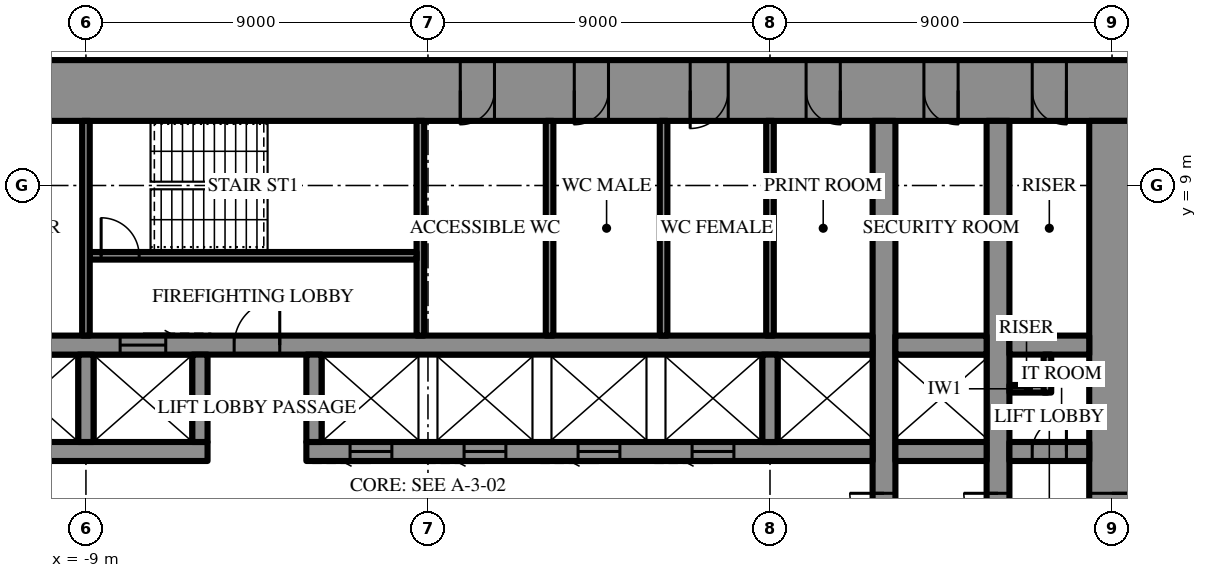
"""IFC4 building model, lengths in metres.
Left out: names, types, materials, properties, quantities, classifications, styles, units other than length and angle.
Written with IfcOpenShell. Run it as: python <this file> out.ifc"""

import sys

from ifc_helpers import new_model, si_unit, direction, frame, frame_2d, origin, place, context, subcontext, project, spatial, rectangle, extrude, element, fill, save


model = new_model("IFC4")
c1 = context("Model", 3, precision=1e-05, world=origin(), true_north=direction((0.0, 1.0)))
c2 = subcontext(c1, "Body", "Model", "MODEL_VIEW")
j1 = project(units=[si_unit("LENGTHUNIT", "METRE"), si_unit("PLANEANGLEUNIT", "RADIAN")], contexts=[c1])
p1 = place(None, origin())
s1 = spatial("IfcSite", under=j1, at=p1, CompositionType="ELEMENT")
p2 = place(p1, origin())
s2 = spatial("IfcBuilding", under=s1, at=p2, CompositionType="ELEMENT")
p3 = place(p2, frame((0.0, 0.0, 127.9)))
s3 = spatial("IfcBuildingStorey", under=s2, at=p3, CompositionType="ELEMENT", Elevation=127.9)
p4 = place(p3, frame((-18.6, 11.5, 0.0), z_axis=(0.0, 0.0, 1.0), x_axis=(1.0, 0.0, 0.0)))
e1 = element("IfcWall", 1, at=p4, inside=s3, PredefinedType="SHEAR", context=c2, shape_type="SweptSolid", body=[
    extrude(rectangle(XDim=37.2, YDim=1.6, at=frame_2d((18.6, 0.0))), origin(), (0.0, 0.0, 1.0), 4.2),
])
p5 = place(p4, frame((19.45, 0.0, 0.0)))
e2 = element("IfcOpeningElement", 2, at=p5, cuts=e1, PredefinedType="OPENING", context=c2, shape_type="SweptSolid", body=[
    extrude(rectangle(XDim=0.9, YDim=2.2, at=frame_2d((0.45, 1.1))), frame((0.0, 0.81, 0.0), z_axis=(0.0, -1.0, 0.0), x_axis=(1.0, 0.0, 0.0)), (0.0, 0.0, 1.0), 1.62),
])
p6 = place(p4, frame((22.45, 0.0, 0.0)))
e3 = element("IfcOpeningElement", 3, at=p6, cuts=e1, PredefinedType="OPENING", context=c2, shape_type="SweptSolid", body=[
    extrude(rectangle(XDim=0.9, YDim=2.2, at=frame_2d((0.45, 1.1))), frame((0.0, 0.81, 0.0), z_axis=(0.0, -1.0, 0.0), x_axis=(1.0, 0.0, 0.0)), (0.0, 0.0, 1.0), 1.62),
])
p7 = place(p4, frame((25.5, 0.0, 0.0)))
e4 = element("IfcOpeningElement", 4, at=p7, cuts=e1, PredefinedType="OPENING", context=c2, shape_type="SweptSolid", body=[
    extrude(rectangle(XDim=1.0, YDim=2.2, at=frame_2d((0.5, 1.1))), frame((0.0, 0.81, 0.0), z_axis=(0.0, -1.0, 0.0), x_axis=(1.0, 0.0, 0.0)), (0.0, 0.0, 1.0), 1.62),
])
p8 = place(p4, frame((1.8, 0.0, 0.0)))
e5 = element("IfcOpeningElement", 5, at=p8, cuts=e1, PredefinedType="OPENING", context=c2, shape_type="SweptSolid", body=[
    extrude(rectangle(XDim=0.9, YDim=2.2, at=frame_2d((0.45, 1.1))), frame((0.0, 0.81, 0.0), z_axis=(0.0, -1.0, 0.0), x_axis=(1.0, 0.0, 0.0)), (0.0, 0.0, 1.0), 1.62),
])
p9 = place(p4, frame((4.65, 0.0, 0.0)))
e6 = element("IfcOpeningElement", 6, at=p9, cuts=e1, PredefinedType="OPENING", context=c2, shape_type="SweptSolid", body=[
    extrude(rectangle(XDim=0.9, YDim=2.2, at=frame_2d((0.45, 1.1))), frame((0.0, 0.81, 0.0), z_axis=(0.0, -1.0, 0.0), x_axis=(1.0, 0.0, 0.0)), (0.0, 0.0, 1.0), 1.62),
])
p10 = place(p4, frame((7.75, 0.0, 0.0)))
e7 = element("IfcOpeningElement", 7, at=p10, cuts=e1, PredefinedType="OPENING", context=c2, shape_type="SweptSolid", body=[
    extrude(rectangle(XDim=0.9, YDim=2.2, at=frame_2d((0.45, 1.1))), frame((0.0, 0.81, 0.0), z_axis=(0.0, -1.0, 0.0), x_axis=(1.0, 0.0, 0.0)), (0.0, 0.0, 1.0), 1.62),
])
p11 = place(p4, frame((28.55, 0.0, 0.0)))
e8 = element("IfcOpeningElement", 8, at=p11, cuts=e1, PredefinedType="OPENING", context=c2, shape_type="SweptSolid", body=[
    extrude(rectangle(XDim=0.9, YDim=2.2, at=frame_2d((0.45, 1.1))), frame((0.0, 0.81, 0.0), z_axis=(0.0, -1.0, 0.0), x_axis=(1.0, 0.0, 0.0)), (0.0, 0.0, 1.0), 1.62),
])
p12 = place(p4, frame((31.65, 0.0, 0.0)))
e9 = element("IfcOpeningElement", 9, at=p12, cuts=e1, PredefinedType="OPENING", context=c2, shape_type="SweptSolid", body=[
    extrude(rectangle(XDim=0.9, YDim=2.2, at=frame_2d((0.45, 1.1))), frame((0.0, 0.81, 0.0), z_axis=(0.0, -1.0, 0.0), x_axis=(1.0, 0.0, 0.0)), (0.0, 0.0, 1.0), 1.62),
])
p13 = place(p4, frame((34.5, 0.0, 0.0)))
e10 = element("IfcOpeningElement", 10, at=p13, cuts=e1, PredefinedType="OPENING", context=c2, shape_type="SweptSolid", body=[
    extrude(rectangle(XDim=0.9, YDim=2.2, at=frame_2d((0.45, 1.1))), frame((0.0, 0.81, 0.0), z_axis=(0.0, -1.0, 0.0), x_axis=(1.0, 0.0, 0.0)), (0.0, 0.0, 1.0), 1.62),
])
p14 = place(p3, frame((18.0, -10.7, 0.0), z_axis=(0.0, 0.0, 1.0), x_axis=(0.0, 1.0, 0.0)))
e11 = element("IfcWall", 11, at=p14, inside=s3, PredefinedType="SHEAR", context=c2, shape_type="SweptSolid", body=[
    extrude(rectangle(XDim=21.4, YDim=1.2, at=frame_2d((10.7, 0.0))), origin(), (0.0, 0.0, 1.0), 4.2),
])
p15 = place(p14, frame((9.8, 0.0, 0.0)))
e12 = element("IfcOpeningElement", 12, at=p15, cuts=e11, PredefinedType="OPENING", context=c2, shape_type="SweptSolid", body=[
    extrude(rectangle(XDim=1.8, YDim=2.4, at=frame_2d((0.9, 1.2))), frame((0.0, 0.61, 0.0), z_axis=(0.0, -1.0, 0.0), x_axis=(1.0, 0.0, 0.0)), (0.0, 0.0, 1.0), 1.22),
])
p16 = place(p3, frame((12.0, -10.7, 0.0), z_axis=(0.0, 0.0, 1.0), x_axis=(0.0, 1.0, 0.0)))
e13 = element("IfcWall", 13, at=p16, inside=s3, PredefinedType="SHEAR", context=c2, shape_type="SweptSolid", body=[
    extrude(rectangle(XDim=21.4, YDim=0.6, at=frame_2d((10.7, 0.0))), origin(), (0.0, 0.0, 1.0), 4.2),
])
p17 = place(p16, frame((9.8, 0.0, 0.0)))
e14 = element("IfcOpeningElement", 14, at=p17, cuts=e13, PredefinedType="OPENING", context=c2, shape_type="SweptSolid", body=[
    extrude(rectangle(XDim=1.8, YDim=2.4, at=frame_2d((0.9, 1.2))), frame((0.0, 0.31, 0.0), z_axis=(0.0, -1.0, 0.0), x_axis=(1.0, 0.0, 0.0)), (0.0, 0.0, 1.0), 0.62),
])
p18 = place(p3, frame((15.0, -10.7, 0.0), z_axis=(0.0, 0.0, 1.0), x_axis=(0.0, 1.0, 0.0)))
e15 = element("IfcWall", 15, at=p18, inside=s3, PredefinedType="SHEAR", context=c2, shape_type="SweptSolid", body=[
    extrude(rectangle(XDim=21.4, YDim=0.6, at=frame_2d((10.7, 0.0))), origin(), (0.0, 0.0, 1.0), 4.2),
])
p19 = place(p18, frame((9.8, 0.0, 0.0)))
e16 = element("IfcOpeningElement", 16, at=p19, cuts=e15, PredefinedType="OPENING", context=c2, shape_type="SweptSolid", body=[
    extrude(rectangle(XDim=1.8, YDim=2.4, at=frame_2d((0.9, 1.2))), frame((0.0, 0.31, 0.0), z_axis=(0.0, -1.0, 0.0), x_axis=(1.0, 0.0, 0.0)), (0.0, 0.0, 1.0), 0.62),
])
p20 = place(p3, frame((-11.7, 2.0, 0.0), z_axis=(0.0, 0.0, 1.0), x_axis=(1.0, 0.0, 0.0)))
e17 = element("IfcWall", 17, at=p20, inside=s3, PredefinedType="SHEAR", context=c2, shape_type="SweptSolid", body=[
    extrude(rectangle(XDim=5.9, YDim=0.5, at=frame_2d((2.95, 0.0))), origin(), (0.0, 0.0, 1.0), 4.2),
])
p21 = place(p3, frame((-3.2, 2.0, 0.0), z_axis=(0.0, 0.0, 1.0), x_axis=(1.0, 0.0, 0.0)))
e18 = element("IfcWall", 18, at=p21, inside=s3, PredefinedType="SHEAR", context=c2, shape_type="SweptSolid", body=[
    extrude(rectangle(XDim=14.9, YDim=0.5, at=frame_2d((7.45, 0.0))), origin(), (0.0, 0.0, 1.0), 4.2),
])
p22 = place(p21, frame((1.15, 0.0, 0.0)))
e19 = element("IfcOpeningElement", 19, at=p22, cuts=e18, PredefinedType="OPENING", context=c2, shape_type="SweptSolid", body=[
    extrude(rectangle(XDim=1.1, YDim=2.2, at=frame_2d((0.55, 1.1))), frame((0.0, 0.26, 0.0), z_axis=(0.0, -1.0, 0.0), x_axis=(1.0, 0.0, 0.0)), (0.0, 0.0, 1.0), 0.52),
])
p23 = place(p21, frame((4.15, 0.0, 0.0)))
e20 = element("IfcOpeningElement", 20, at=p23, cuts=e18, PredefinedType="OPENING", context=c2, shape_type="SweptSolid", body=[
    extrude(rectangle(XDim=1.1, YDim=2.2, at=frame_2d((0.55, 1.1))), frame((0.0, 0.26, 0.0), z_axis=(0.0, -1.0, 0.0), x_axis=(1.0, 0.0, 0.0)), (0.0, 0.0, 1.0), 0.52),
])
p24 = place(p21, frame((7.15, 0.0, 0.0)))
e21 = element("IfcOpeningElement", 21, at=p24, cuts=e18, PredefinedType="OPENING", context=c2, shape_type="SweptSolid", body=[
    extrude(rectangle(XDim=1.1, YDim=2.2, at=frame_2d((0.55, 1.1))), frame((0.0, 0.26, 0.0), z_axis=(0.0, -1.0, 0.0), x_axis=(1.0, 0.0, 0.0)), (0.0, 0.0, 1.0), 0.52),
])
p25 = place(p21, frame((10.15, 0.0, 0.0)))
e22 = element("IfcOpeningElement", 22, at=p25, cuts=e18, PredefinedType="OPENING", context=c2, shape_type="SweptSolid", body=[
    extrude(rectangle(XDim=1.1, YDim=2.2, at=frame_2d((0.55, 1.1))), frame((0.0, 0.26, 0.0), z_axis=(0.0, -1.0, 0.0), x_axis=(1.0, 0.0, 0.0)), (0.0, 0.0, 1.0), 0.52),
])
p26 = place(p3, frame((12.3, 2.0, 0.0), z_axis=(0.0, 0.0, 1.0), x_axis=(1.0, 0.0, 0.0)))
e23 = element("IfcWall", 23, at=p26, inside=s3, PredefinedType="SHEAR", context=c2, shape_type="SweptSolid", body=[
    extrude(rectangle(XDim=2.4, YDim=0.5, at=frame_2d((1.2, 0.0))), origin(), (0.0, 0.0, 1.0), 4.2),
])
p27 = place(p3, frame((15.3, 2.0, 0.0), z_axis=(0.0, 0.0, 1.0), x_axis=(1.0, 0.0, 0.0)))
e24 = element("IfcWall", 24, at=p27, inside=s3, PredefinedType="SHEAR", context=c2, shape_type="SweptSolid", body=[
    extrude(rectangle(XDim=2.1, YDim=0.5, at=frame_2d((1.05, 0.0))), origin(), (0.0, 0.0, 1.0), 4.2),
])
p28 = place(p27, frame((0.6, 0.0, 0.0)))
e25 = element("IfcOpeningElement", 25, at=p28, cuts=e24, PredefinedType="OPENING", context=c2, shape_type="SweptSolid", body=[
    extrude(rectangle(XDim=0.9, YDim=2.2, at=frame_2d((0.45, 1.1))), frame((0.0, 0.26, 0.0), z_axis=(0.0, -1.0, 0.0), x_axis=(1.0, 0.0, 0.0)), (0.0, 0.0, 1.0), 0.52),
])
p29 = place(p3, frame((-11.7, 4.8, 0.0), z_axis=(0.0, 0.0, 1.0), x_axis=(1.0, 0.0, 0.0)))
e26 = element("IfcWall", 26, at=p29, inside=s3, PredefinedType="SHEAR", context=c2, shape_type="SweptSolid", body=[
    extrude(rectangle(XDim=23.4, YDim=0.5, at=frame_2d((11.7, 0.0))), origin(), (0.0, 0.0, 1.0), 4.2),
])
p30 = place(p29, frame((6.6, 0.0, 0.0)))
e27 = element("IfcOpeningElement", 27, at=p30, cuts=e26, PredefinedType="OPENING", context=c2, shape_type="SweptSolid", body=[
    extrude(rectangle(XDim=1.2, YDim=2.2, at=frame_2d((0.6, 1.1))), frame((0.0, 0.26, 0.0), z_axis=(0.0, -1.0, 0.0), x_axis=(1.0, 0.0, 0.0)), (0.0, 0.0, 1.0), 0.52),
])
p31 = place(p29, frame((3.6, 0.0, 0.0)))
e28 = element("IfcOpeningElement", 28, at=p31, cuts=e26, PredefinedType="OPENING", context=c2, shape_type="SweptSolid", body=[
    extrude(rectangle(XDim=1.2, YDim=2.2, at=frame_2d((0.6, 1.1))), frame((0.0, 0.26, 0.0), z_axis=(0.0, -1.0, 0.0), x_axis=(1.0, 0.0, 0.0)), (0.0, 0.0, 1.0), 0.52),
])
p32 = place(p3, frame((12.3, 4.8, 0.0), z_axis=(0.0, 0.0, 1.0), x_axis=(1.0, 0.0, 0.0)))
e29 = element("IfcWall", 29, at=p32, inside=s3, PredefinedType="SHEAR", context=c2, shape_type="SweptSolid", body=[
    extrude(rectangle(XDim=2.4, YDim=0.5, at=frame_2d((1.2, 0.0))), origin(), (0.0, 0.0, 1.0), 4.2),
])
p33 = place(p3, frame((15.3, 4.8, 0.0), z_axis=(0.0, 0.0, 1.0), x_axis=(1.0, 0.0, 0.0)))
e30 = element("IfcWall", 30, at=p33, inside=s3, PredefinedType="SHEAR", context=c2, shape_type="SweptSolid", body=[
    extrude(rectangle(XDim=2.1, YDim=0.5, at=frame_2d((1.05, 0.0))), origin(), (0.0, 0.0, 1.0), 4.2),
])
for number, where, z_axis, x_axis in (
    (31, (-9.0, 2.25, 0.0), (0.0, 0.0, 1.0), (0.0, 1.0, 0.0)),
    (32, (-6.0, 2.25, 0.0), (0.0, 0.0, 1.0), (0.0, 1.0, 0.0)),
    (33, (-3.0, 2.25, 0.0), (0.0, 0.0, 1.0), (0.0, 1.0, 0.0)),
    (34, (9.0, 2.25, 0.0), (0.0, 0.0, 1.0), (0.0, 1.0, 0.0)),
):
    element("IfcWall", number, at=place(p3, frame(where, z_axis=z_axis, x_axis=x_axis)), inside=s3, PredefinedType="SHEAR", context=c2, shape_type="SweptSolid", body=[
        extrude(rectangle(XDim=2.3, YDim=0.4, at=frame_2d((1.15, 0.0))), origin(), (0.0, 0.0, 1.0), 4.2),
    ])
p34 = place(p3, frame((-0.2, 5.05, 0.0), z_axis=(0.0, 0.0, 1.0), x_axis=(0.0, 1.0, 0.0)))
e35 = element("IfcWall", 35, at=p34, inside=s3, PredefinedType="SHEAR", context=c2, shape_type="SweptSolid", body=[
    extrude(rectangle(XDim=5.65, YDim=0.2, at=frame_2d((2.825, 0.0))), origin(), (0.0, 0.0, 1.0), 4.2),
])
p35 = place(p3, frame((-8.9, 7.15, 0.0), z_axis=(0.0, 0.0, 1.0), x_axis=(1.0, 0.0, 0.0)))
e36 = element("IfcWall", 36, at=p35, inside=s3, PredefinedType="SHEAR", context=c2, shape_type="SweptSolid", body=[
    extrude(rectangle(XDim=8.6, YDim=0.2, at=frame_2d((4.3, 0.0))), origin(), (0.0, 0.0, 1.0), 4.2),
])
p36 = place(p35, frame((0.3, 0.0, 0.0)))
e37 = element("IfcOpeningElement", 37, at=p36, cuts=e36, PredefinedType="OPENING", context=c2, shape_type="SweptSolid", body=[
    extrude(rectangle(XDim=1.0, YDim=2.2, at=frame_2d((0.5, 1.1))), frame((0.0, 0.11, 0.0), z_axis=(0.0, -1.0, 0.0), x_axis=(1.0, 0.0, 0.0)), (0.0, 0.0, 1.0), 0.22),
])
for number, where, z_axis, x_axis in (
    (38, (-9.0, 5.05, 0.0), (0.0, 0.0, 1.0), (0.0, 1.0, 0.0)),
    (39, (9.0, 5.05, 0.0), (0.0, 0.0, 1.0), (0.0, 1.0, 0.0)),
    (40, (3.2, 5.05, 0.0), (0.0, 0.0, 1.0), (0.0, 1.0, 0.0)),
    (41, (6.2, 5.05, 0.0), (0.0, 0.0, 1.0), (0.0, 1.0, 0.0)),
):
    element("IfcWall", number, at=place(p3, frame(where, z_axis=z_axis, x_axis=x_axis)), inside=s3, PredefinedType="PARTITIONING", context=c2, shape_type="SweptSolid", body=[
        extrude(rectangle(XDim=5.65, YDim=0.2, at=frame_2d((2.825, 0.0))), origin(), (0.0, 0.0, 1.0), 4.0),
    ])
for number, where, z_axis, x_axis in (
    (42, (15.3, 3.65, 0.0), (0.0, 0.0, 1.0), (1.0, 0.0, 0.0)),
    (43, (16.3, 3.55, 0.0), (0.0, 0.0, 1.0), (0.0, 1.0, 0.0)),
):
    element("IfcWall", number, at=place(p3, frame(where, z_axis=z_axis, x_axis=x_axis)), inside=s3, PredefinedType="PARTITIONING", context=c2, shape_type="SweptSolid", body=[
        extrude(rectangle(XDim=1.0, YDim=0.2, at=frame_2d((0.5, 0.0))), origin(), (0.0, 0.0, 1.0), 4.0),
    ])
p37 = place(p15, frame((1.8, 0.0, 0.0), z_axis=(0.0, 0.0, 1.0), x_axis=(-1.0, 0.0, 0.0)))
e44 = element("IfcDoor", 44, at=p37, inside=s3, OperationType="DOUBLE_DOOR_SINGLE_SWING", PredefinedType="DOOR", context=c2, shape_type="SweptSolid", body=[
    extrude(rectangle(XDim=1.8, YDim=2.4, at=frame_2d((0.9, 1.2))), frame((0.0, 0.025, 0.0), z_axis=(0.0, -1.0, 0.0), x_axis=(1.0, 0.0, 0.0)), (0.0, 0.0, 1.0), 0.05),
])
fill(e12, e44)
p38 = place(p30, origin())
e45 = element("IfcDoor", 45, at=p38, inside=s3, OperationType="SINGLE_SWING_LEFT", PredefinedType="DOOR", context=c2, shape_type="SweptSolid", body=[
    extrude(rectangle(XDim=1.2, YDim=2.2, at=frame_2d((0.6, 1.1))), frame((0.0, 0.025, 0.0), z_axis=(0.0, -1.0, 0.0), x_axis=(1.0, 0.0, 0.0)), (0.0, 0.0, 1.0), 0.05),
])
fill(e27, e45)
p39 = place(p36, origin())
e46 = element("IfcDoor", 46, at=p39, inside=s3, OperationType="SINGLE_SWING_RIGHT", PredefinedType="DOOR", context=c2, shape_type="SweptSolid", body=[
    extrude(rectangle(XDim=1.0, YDim=2.2, at=frame_2d((0.5, 1.1))), frame((0.0, 0.025, 0.0), z_axis=(0.0, -1.0, 0.0), x_axis=(1.0, 0.0, 0.0)), (0.0, 0.0, 1.0), 0.05),
])
fill(e37, e46)
p40 = place(p5, frame((0.9, 0.0, 0.0), z_axis=(0.0, 0.0, 1.0), x_axis=(-1.0, 0.0, 0.0)))
e47 = element("IfcDoor", 47, at=p40, inside=s3, OperationType="SINGLE_SWING_LEFT", PredefinedType="DOOR", context=c2, shape_type="SweptSolid", body=[
    extrude(rectangle(XDim=0.9, YDim=2.2, at=frame_2d((0.45, 1.1))), frame((0.0, 0.025, 0.0), z_axis=(0.0, -1.0, 0.0), x_axis=(1.0, 0.0, 0.0)), (0.0, 0.0, 1.0), 0.05),
])
fill(e2, e47)
p41 = place(p6, frame((0.9, 0.0, 0.0), z_axis=(0.0, 0.0, 1.0), x_axis=(-1.0, 0.0, 0.0)))
e48 = element("IfcDoor", 48, at=p41, inside=s3, OperationType="SINGLE_SWING_LEFT", PredefinedType="DOOR", context=c2, shape_type="SweptSolid", body=[
    extrude(rectangle(XDim=0.9, YDim=2.2, at=frame_2d((0.45, 1.1))), frame((0.0, 0.025, 0.0), z_axis=(0.0, -1.0, 0.0), x_axis=(1.0, 0.0, 0.0)), (0.0, 0.0, 1.0), 0.05),
])
fill(e3, e48)
p42 = place(p7, frame((1.0, 0.0, 0.0), z_axis=(0.0, 0.0, 1.0), x_axis=(-1.0, 0.0, 0.0)))
e49 = element("IfcDoor", 49, at=p42, inside=s3, OperationType="SINGLE_SWING_LEFT", PredefinedType="DOOR", context=c2, shape_type="SweptSolid", body=[
    extrude(rectangle(XDim=1.0, YDim=2.2, at=frame_2d((0.5, 1.1))), frame((0.0, 0.025, 0.0), z_axis=(0.0, -1.0, 0.0), x_axis=(1.0, 0.0, 0.0)), (0.0, 0.0, 1.0), 0.05),
])
fill(e4, e49)
p43 = place(p11, frame((0.9, 0.0, 0.0), z_axis=(0.0, 0.0, 1.0), x_axis=(-1.0, 0.0, 0.0)))
e50 = element("IfcDoor", 50, at=p43, inside=s3, OperationType="SINGLE_SWING_RIGHT", PredefinedType="DOOR", context=c2, shape_type="SweptSolid", body=[
    extrude(rectangle(XDim=0.9, YDim=2.2, at=frame_2d((0.45, 1.1))), frame((0.0, 0.025, 0.0), z_axis=(0.0, -1.0, 0.0), x_axis=(1.0, 0.0, 0.0)), (0.0, 0.0, 1.0), 0.05),
])
fill(e8, e50)
p44 = place(p12, frame((0.9, 0.0, 0.0), z_axis=(0.0, 0.0, 1.0), x_axis=(-1.0, 0.0, 0.0)))
e51 = element("IfcDoor", 51, at=p44, inside=s3, OperationType="SINGLE_SWING_RIGHT", PredefinedType="DOOR", context=c2, shape_type="SweptSolid", body=[
    extrude(rectangle(XDim=0.9, YDim=2.2, at=frame_2d((0.45, 1.1))), frame((0.0, 0.025, 0.0), z_axis=(0.0, -1.0, 0.0), x_axis=(1.0, 0.0, 0.0)), (0.0, 0.0, 1.0), 0.05),
])
fill(e9, e51)
p45 = place(p13, frame((0.9, 0.0, 0.0), z_axis=(0.0, 0.0, 1.0), x_axis=(-1.0, 0.0, 0.0)))
e52 = element("IfcDoor", 52, at=p45, inside=s3, OperationType="SINGLE_SWING_RIGHT", PredefinedType="DOOR", context=c2, shape_type="SweptSolid", body=[
    extrude(rectangle(XDim=0.9, YDim=2.2, at=frame_2d((0.45, 1.1))), frame((0.0, 0.025, 0.0), z_axis=(0.0, -1.0, 0.0), x_axis=(1.0, 0.0, 0.0)), (0.0, 0.0, 1.0), 0.05),
])
fill(e10, e52)
p46 = place(p28, origin())
e53 = element("IfcDoor", 53, at=p46, inside=s3, OperationType="SINGLE_SWING_LEFT", PredefinedType="DOOR", context=c2, shape_type="SweptSolid", body=[
    extrude(rectangle(XDim=0.9, YDim=2.2, at=frame_2d((0.45, 1.1))), frame((0.0, 0.025, 0.0), z_axis=(0.0, -1.0, 0.0), x_axis=(1.0, 0.0, 0.0)), (0.0, 0.0, 1.0), 0.05),
])
fill(e25, e53)
p47 = place(p17, origin())
e54 = element("IfcDoor", 54, at=p47, inside=s3, OperationType="DOUBLE_DOOR_SINGLE_SWING", PredefinedType="DOOR", context=c2, shape_type="SweptSolid", body=[
    extrude(rectangle(XDim=1.8, YDim=2.4, at=frame_2d((0.9, 1.2))), frame((0.0, 0.025, 0.0), z_axis=(0.0, -1.0, 0.0), x_axis=(1.0, 0.0, 0.0)), (0.0, 0.0, 1.0), 0.05),
])
fill(e14, e54)
p48 = place(p19, origin())
e55 = element("IfcDoor", 55, at=p48, inside=s3, OperationType="DOUBLE_DOOR_SINGLE_SWING", PredefinedType="DOOR", context=c2, shape_type="SweptSolid", body=[
    extrude(rectangle(XDim=1.8, YDim=2.4, at=frame_2d((0.9, 1.2))), frame((0.0, 0.025, 0.0), z_axis=(0.0, -1.0, 0.0), x_axis=(1.0, 0.0, 0.0)), (0.0, 0.0, 1.0), 0.05),
])
fill(e16, e55)
p49 = place(p31, origin())
e56 = element("IfcDoor", 56, at=p49, inside=s3, OperationType="SLIDING_TO_LEFT", PredefinedType="DOOR", context=c2, shape_type="SweptSolid", body=[
    extrude(rectangle(XDim=1.2, YDim=2.2, at=frame_2d((0.6, 1.1))), frame((0.0, 0.025, 0.0), z_axis=(0.0, -1.0, 0.0), x_axis=(1.0, 0.0, 0.0)), (0.0, 0.0, 1.0), 0.05),
])
fill(e28, e56)
p50 = place(p22, frame((1.1, 0.0, 0.0), z_axis=(0.0, 0.0, 1.0), x_axis=(-1.0, 0.0, 0.0)))
e57 = element("IfcDoor", 57, at=p50, inside=s3, OperationType="SLIDING_TO_LEFT", PredefinedType="DOOR", context=c2, shape_type="SweptSolid", body=[
    extrude(rectangle(XDim=1.1, YDim=2.2, at=frame_2d((0.55, 1.1))), frame((0.0, 0.025, 0.0), z_axis=(0.0, -1.0, 0.0), x_axis=(1.0, 0.0, 0.0)), (0.0, 0.0, 1.0), 0.05),
])
fill(e19, e57)
p51 = place(p23, frame((1.1, 0.0, 0.0), z_axis=(0.0, 0.0, 1.0), x_axis=(-1.0, 0.0, 0.0)))
e58 = element("IfcDoor", 58, at=p51, inside=s3, OperationType="SLIDING_TO_LEFT", PredefinedType="DOOR", context=c2, shape_type="SweptSolid", body=[
    extrude(rectangle(XDim=1.1, YDim=2.2, at=frame_2d((0.55, 1.1))), frame((0.0, 0.025, 0.0), z_axis=(0.0, -1.0, 0.0), x_axis=(1.0, 0.0, 0.0)), (0.0, 0.0, 1.0), 0.05),
])
fill(e20, e58)
p52 = place(p24, frame((1.1, 0.0, 0.0), z_axis=(0.0, 0.0, 1.0), x_axis=(-1.0, 0.0, 0.0)))
e59 = element("IfcDoor", 59, at=p52, inside=s3, OperationType="SLIDING_TO_LEFT", PredefinedType="DOOR", context=c2, shape_type="SweptSolid", body=[
    extrude(rectangle(XDim=1.1, YDim=2.2, at=frame_2d((0.55, 1.1))), frame((0.0, 0.025, 0.0), z_axis=(0.0, -1.0, 0.0), x_axis=(1.0, 0.0, 0.0)), (0.0, 0.0, 1.0), 0.05),
])
fill(e21, e59)
p53 = place(p25, frame((1.1, 0.0, 0.0), z_axis=(0.0, 0.0, 1.0), x_axis=(-1.0, 0.0, 0.0)))
e60 = element("IfcDoor", 60, at=p53, inside=s3, OperationType="SLIDING_TO_LEFT", PredefinedType="DOOR", context=c2, shape_type="SweptSolid", body=[
    extrude(rectangle(XDim=1.1, YDim=2.2, at=frame_2d((0.55, 1.1))), frame((0.0, 0.025, 0.0), z_axis=(0.0, -1.0, 0.0), x_axis=(1.0, 0.0, 0.0)), (0.0, 0.0, 1.0), 0.05),
])
fill(e22, e60)
save(model, sys.argv[1])
